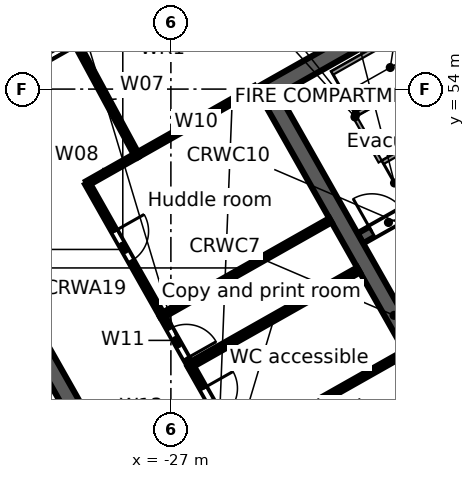
"""IFC4 building model, lengths in metres.
Left out: names, types, materials, properties, quantities, classifications, styles, units other than length and angle.
Written with IfcOpenShell. Run it as: python <this file> out.ifc"""

import sys

from ifc_helpers import new_model, si_unit, direction, frame, frame_2d, origin, place, context, subcontext, project, spatial, rectangle, extrude, element, fill, save


model = new_model("IFC4")
c1 = context("Model", 3, precision=1e-05, world=origin(), true_north=direction((0.0, 1.0)))
c2 = subcontext(c1, "Body", "Model", "MODEL_VIEW")
j1 = project(units=[si_unit("LENGTHUNIT", "METRE"), si_unit("PLANEANGLEUNIT", "RADIAN")], contexts=[c1])
p1 = place(None, origin())
s1 = spatial("IfcSite", under=j1, at=p1, CompositionType="ELEMENT")
p2 = place(p1, origin())
s2 = spatial("IfcBuilding", under=s1, at=p2, CompositionType="ELEMENT")
p3 = place(p2, frame((0.0, 0.0, 219.2)))
s3 = spatial("IfcBuildingStorey", under=s2, at=p3, CompositionType="ELEMENT", Elevation=219.2)
p4 = place(p3, frame((-0.046, 47.974, 0.0), z_axis=(0.0, 0.0, 1.0), x_axis=(-0.870356579543, -0.492421998337, 0.0)))
e1 = element("IfcWall", 1, at=p4, inside=s3, PredefinedType="STANDARD", context=c2, shape_type="SweptSolid", body=[
    extrude(rectangle(XDim=43.754, YDim=0.25, at=frame_2d((21.877, 0.0))), origin(), (0.0, 0.0, 1.0), 3.62),
])
p5 = place(p4, frame((41.061, 0.0, 0.8)))
e2 = element("IfcOpeningElement", 2, at=p5, cuts=e1, PredefinedType="OPENING", context=c2, shape_type="SweptSolid", body=[
    extrude(rectangle(XDim=2.4, YDim=2.2, at=frame_2d((1.2, 1.1))), frame((0.0, 0.135, 0.0), z_axis=(0.0, -1.0, 0.0), x_axis=(1.0, 0.0, 0.0)), (0.0, 0.0, 1.0), 0.27),
])
p6 = place(p4, frame((38.443, 0.0, 0.0)))
e3 = element("IfcOpeningElement", 3, at=p6, cuts=e1, PredefinedType="OPENING", context=c2, shape_type="SweptSolid", body=[
    extrude(rectangle(XDim=1.8, YDim=2.4, at=frame_2d((0.9, 1.2))), frame((0.0, 0.135, 0.0), z_axis=(0.0, -1.0, 0.0), x_axis=(1.0, 0.0, 0.0)), (0.0, 0.0, 1.0), 0.27),
])
p7 = place(p4, frame((35.225, 0.0, 0.8)))
e4 = element("IfcOpeningElement", 4, at=p7, cuts=e1, PredefinedType="OPENING", context=c2, shape_type="SweptSolid", body=[
    extrude(rectangle(XDim=2.4, YDim=2.2, at=frame_2d((1.2, 1.1))), frame((0.0, 0.135, 0.0), z_axis=(0.0, -1.0, 0.0), x_axis=(1.0, 0.0, 0.0)), (0.0, 0.0, 1.0), 0.27),
])
p8 = place(p4, frame((32.307, 0.0, 0.8)))
e5 = element("IfcOpeningElement", 5, at=p8, cuts=e1, PredefinedType="OPENING", context=c2, shape_type="SweptSolid", body=[
    extrude(rectangle(XDim=2.4, YDim=2.2, at=frame_2d((1.2, 1.1))), frame((0.0, 0.135, 0.0), z_axis=(0.0, -1.0, 0.0), x_axis=(1.0, 0.0, 0.0)), (0.0, 0.0, 1.0), 0.27),
])
p9 = place(p4, frame((29.688, 0.0, 0.0)))
e6 = element("IfcOpeningElement", 6, at=p9, cuts=e1, PredefinedType="OPENING", context=c2, shape_type="SweptSolid", body=[
    extrude(rectangle(XDim=1.8, YDim=2.4, at=frame_2d((0.9, 1.2))), frame((0.0, 0.135, 0.0), z_axis=(0.0, -1.0, 0.0), x_axis=(1.0, 0.0, 0.0)), (0.0, 0.0, 1.0), 0.27),
])
p10 = place(p4, frame((26.47, 0.0, 0.8)))
e7 = element("IfcOpeningElement", 7, at=p10, cuts=e1, PredefinedType="OPENING", context=c2, shape_type="SweptSolid", body=[
    extrude(rectangle(XDim=2.4, YDim=2.2, at=frame_2d((1.2, 1.1))), frame((0.0, 0.135, 0.0), z_axis=(0.0, -1.0, 0.0), x_axis=(1.0, 0.0, 0.0)), (0.0, 0.0, 1.0), 0.27),
])
p11 = place(p4, frame((23.552, 0.0, 0.8)))
e8 = element("IfcOpeningElement", 8, at=p11, cuts=e1, PredefinedType="OPENING", context=c2, shape_type="SweptSolid", body=[
    extrude(rectangle(XDim=2.4, YDim=2.2, at=frame_2d((1.2, 1.1))), frame((0.0, 0.135, 0.0), z_axis=(0.0, -1.0, 0.0), x_axis=(1.0, 0.0, 0.0)), (0.0, 0.0, 1.0), 0.27),
])
p12 = place(p4, frame((20.934, 0.0, 0.0)))
e9 = element("IfcOpeningElement", 9, at=p12, cuts=e1, PredefinedType="OPENING", context=c2, shape_type="SweptSolid", body=[
    extrude(rectangle(XDim=1.8, YDim=2.4, at=frame_2d((0.9, 1.2))), frame((0.0, 0.135, 0.0), z_axis=(0.0, -1.0, 0.0), x_axis=(1.0, 0.0, 0.0)), (0.0, 0.0, 1.0), 0.27),
])
p13 = place(p4, frame((17.716, 0.0, 0.8)))
e10 = element("IfcOpeningElement", 10, at=p13, cuts=e1, PredefinedType="OPENING", context=c2, shape_type="SweptSolid", body=[
    extrude(rectangle(XDim=2.4, YDim=2.2, at=frame_2d((1.2, 1.1))), frame((0.0, 0.135, 0.0), z_axis=(0.0, -1.0, 0.0), x_axis=(1.0, 0.0, 0.0)), (0.0, 0.0, 1.0), 0.27),
])
p14 = place(p4, frame((14.798, 0.0, 0.8)))
e11 = element("IfcOpeningElement", 11, at=p14, cuts=e1, PredefinedType="OPENING", context=c2, shape_type="SweptSolid", body=[
    extrude(rectangle(XDim=2.4, YDim=2.2, at=frame_2d((1.2, 1.1))), frame((0.0, 0.135, 0.0), z_axis=(0.0, -1.0, 0.0), x_axis=(1.0, 0.0, 0.0)), (0.0, 0.0, 1.0), 0.27),
])
p15 = place(p4, frame((12.179, 0.0, 0.0)))
e12 = element("IfcOpeningElement", 12, at=p15, cuts=e1, PredefinedType="OPENING", context=c2, shape_type="SweptSolid", body=[
    extrude(rectangle(XDim=1.8, YDim=2.4, at=frame_2d((0.9, 1.2))), frame((0.0, 0.135, 0.0), z_axis=(0.0, -1.0, 0.0), x_axis=(1.0, 0.0, 0.0)), (0.0, 0.0, 1.0), 0.27),
])
p16 = place(p4, frame((8.961, 0.0, 0.8)))
e13 = element("IfcOpeningElement", 13, at=p16, cuts=e1, PredefinedType="OPENING", context=c2, shape_type="SweptSolid", body=[
    extrude(rectangle(XDim=2.4, YDim=2.2, at=frame_2d((1.2, 1.1))), frame((0.0, 0.135, 0.0), z_axis=(0.0, -1.0, 0.0), x_axis=(1.0, 0.0, 0.0)), (0.0, 0.0, 1.0), 0.27),
])
p17 = place(p4, frame((6.043, 0.0, 0.8)))
e14 = element("IfcOpeningElement", 14, at=p17, cuts=e1, PredefinedType="OPENING", context=c2, shape_type="SweptSolid", body=[
    extrude(rectangle(XDim=2.4, YDim=2.2, at=frame_2d((1.2, 1.1))), frame((0.0, 0.135, 0.0), z_axis=(0.0, -1.0, 0.0), x_axis=(1.0, 0.0, 0.0)), (0.0, 0.0, 1.0), 0.27),
])
p18 = place(p4, frame((3.425, 0.0, 0.0)))
e15 = element("IfcOpeningElement", 15, at=p18, cuts=e1, PredefinedType="OPENING", context=c2, shape_type="SweptSolid", body=[
    extrude(rectangle(XDim=1.8, YDim=2.4, at=frame_2d((0.9, 1.2))), frame((0.0, 0.135, 0.0), z_axis=(0.0, -1.0, 0.0), x_axis=(1.0, 0.0, 0.0)), (0.0, 0.0, 1.0), 0.27),
])
p19 = place(p4, frame((0.207, 0.0, 0.8)))
e16 = element("IfcOpeningElement", 16, at=p19, cuts=e1, PredefinedType="OPENING", context=c2, shape_type="SweptSolid", body=[
    extrude(rectangle(XDim=2.4, YDim=2.2, at=frame_2d((1.2, 1.1))), frame((0.0, 0.135, 0.0), z_axis=(0.0, -1.0, 0.0), x_axis=(1.0, 0.0, 0.0)), (0.0, 0.0, 1.0), 0.27),
])
p20 = place(p3, frame((-58.732, 38.771, 0.0), z_axis=(0.0, 0.0, 1.0), x_axis=(0.870354824205, 0.492425100887, 0.0)))
e17 = element("IfcWall", 17, at=p20, inside=s3, PredefinedType="STANDARD", context=c2, shape_type="SweptSolid", body=[
    extrude(rectangle(XDim=64.006, YDim=0.25, at=frame_2d((32.003, 0.0))), origin(), (0.0, 0.0, 1.0), 3.62),
])
p21 = place(p20, frame((61.259, 0.0, 0.8)))
e18 = element("IfcOpeningElement", 18, at=p21, cuts=e17, PredefinedType="OPENING", context=c2, shape_type="SweptSolid", body=[
    extrude(rectangle(XDim=2.4, YDim=2.2, at=frame_2d((1.2, 1.1))), frame((0.0, 0.135, 0.0), z_axis=(0.0, -1.0, 0.0), x_axis=(1.0, 0.0, 0.0)), (0.0, 0.0, 1.0), 0.27),
])
p22 = place(p20, frame((58.216, 0.0, 0.8)))
e19 = element("IfcOpeningElement", 19, at=p22, cuts=e17, PredefinedType="OPENING", context=c2, shape_type="SweptSolid", body=[
    extrude(rectangle(XDim=2.4, YDim=2.2, at=frame_2d((1.2, 1.1))), frame((0.0, 0.135, 0.0), z_axis=(0.0, -1.0, 0.0), x_axis=(1.0, 0.0, 0.0)), (0.0, 0.0, 1.0), 0.27),
])
p23 = place(p20, frame((55.173, 0.0, 0.8)))
e20 = element("IfcOpeningElement", 20, at=p23, cuts=e17, PredefinedType="OPENING", context=c2, shape_type="SweptSolid", body=[
    extrude(rectangle(XDim=2.4, YDim=2.2, at=frame_2d((1.2, 1.1))), frame((0.0, 0.135, 0.0), z_axis=(0.0, -1.0, 0.0), x_axis=(1.0, 0.0, 0.0)), (0.0, 0.0, 1.0), 0.27),
])
p24 = place(p20, frame((52.129, 0.0, 0.8)))
e21 = element("IfcOpeningElement", 21, at=p24, cuts=e17, PredefinedType="OPENING", context=c2, shape_type="SweptSolid", body=[
    extrude(rectangle(XDim=2.4, YDim=2.2, at=frame_2d((1.2, 1.1))), frame((0.0, 0.135, 0.0), z_axis=(0.0, -1.0, 0.0), x_axis=(1.0, 0.0, 0.0)), (0.0, 0.0, 1.0), 0.27),
])
p25 = place(p20, frame((49.086, 0.0, 0.8)))
e22 = element("IfcOpeningElement", 22, at=p25, cuts=e17, PredefinedType="OPENING", context=c2, shape_type="SweptSolid", body=[
    extrude(rectangle(XDim=2.4, YDim=2.2, at=frame_2d((1.2, 1.1))), frame((0.0, 0.135, 0.0), z_axis=(0.0, -1.0, 0.0), x_axis=(1.0, 0.0, 0.0)), (0.0, 0.0, 1.0), 0.27),
])
p26 = place(p20, frame((46.043, 0.0, 0.8)))
e23 = element("IfcOpeningElement", 23, at=p26, cuts=e17, PredefinedType="OPENING", context=c2, shape_type="SweptSolid", body=[
    extrude(rectangle(XDim=2.4, YDim=2.2, at=frame_2d((1.2, 1.1))), frame((0.0, 0.135, 0.0), z_axis=(0.0, -1.0, 0.0), x_axis=(1.0, 0.0, 0.0)), (0.0, 0.0, 1.0), 0.27),
])
p27 = place(p20, frame((43.0, 0.0, 0.8)))
e24 = element("IfcOpeningElement", 24, at=p27, cuts=e17, PredefinedType="OPENING", context=c2, shape_type="SweptSolid", body=[
    extrude(rectangle(XDim=2.4, YDim=2.2, at=frame_2d((1.2, 1.1))), frame((0.0, 0.135, 0.0), z_axis=(0.0, -1.0, 0.0), x_axis=(1.0, 0.0, 0.0)), (0.0, 0.0, 1.0), 0.27),
])
p28 = place(p20, frame((39.956, 0.0, 0.8)))
e25 = element("IfcOpeningElement", 25, at=p28, cuts=e17, PredefinedType="OPENING", context=c2, shape_type="SweptSolid", body=[
    extrude(rectangle(XDim=2.4, YDim=2.2, at=frame_2d((1.2, 1.1))), frame((0.0, 0.135, 0.0), z_axis=(0.0, -1.0, 0.0), x_axis=(1.0, 0.0, 0.0)), (0.0, 0.0, 1.0), 0.27),
])
p29 = place(p20, frame((36.913, 0.0, 0.8)))
e26 = element("IfcOpeningElement", 26, at=p29, cuts=e17, PredefinedType="OPENING", context=c2, shape_type="SweptSolid", body=[
    extrude(rectangle(XDim=2.4, YDim=2.2, at=frame_2d((1.2, 1.1))), frame((0.0, 0.135, 0.0), z_axis=(0.0, -1.0, 0.0), x_axis=(1.0, 0.0, 0.0)), (0.0, 0.0, 1.0), 0.27),
])
p30 = place(p20, frame((33.87, 0.0, 0.8)))
e27 = element("IfcOpeningElement", 27, at=p30, cuts=e17, PredefinedType="OPENING", context=c2, shape_type="SweptSolid", body=[
    extrude(rectangle(XDim=2.4, YDim=2.2, at=frame_2d((1.2, 1.1))), frame((0.0, 0.135, 0.0), z_axis=(0.0, -1.0, 0.0), x_axis=(1.0, 0.0, 0.0)), (0.0, 0.0, 1.0), 0.27),
])
p31 = place(p20, frame((30.826, 0.0, 0.8)))
e28 = element("IfcOpeningElement", 28, at=p31, cuts=e17, PredefinedType="OPENING", context=c2, shape_type="SweptSolid", body=[
    extrude(rectangle(XDim=2.4, YDim=2.2, at=frame_2d((1.2, 1.1))), frame((0.0, 0.135, 0.0), z_axis=(0.0, -1.0, 0.0), x_axis=(1.0, 0.0, 0.0)), (0.0, 0.0, 1.0), 0.27),
])
p32 = place(p20, frame((27.783, 0.0, 0.8)))
e29 = element("IfcOpeningElement", 29, at=p32, cuts=e17, PredefinedType="OPENING", context=c2, shape_type="SweptSolid", body=[
    extrude(rectangle(XDim=2.4, YDim=2.2, at=frame_2d((1.2, 1.1))), frame((0.0, 0.135, 0.0), z_axis=(0.0, -1.0, 0.0), x_axis=(1.0, 0.0, 0.0)), (0.0, 0.0, 1.0), 0.27),
])
p33 = place(p20, frame((24.74, 0.0, 0.8)))
e30 = element("IfcOpeningElement", 30, at=p33, cuts=e17, PredefinedType="OPENING", context=c2, shape_type="SweptSolid", body=[
    extrude(rectangle(XDim=2.4, YDim=2.2, at=frame_2d((1.2, 1.1))), frame((0.0, 0.135, 0.0), z_axis=(0.0, -1.0, 0.0), x_axis=(1.0, 0.0, 0.0)), (0.0, 0.0, 1.0), 0.27),
])
p34 = place(p20, frame((21.696, 0.0, 0.8)))
e31 = element("IfcOpeningElement", 31, at=p34, cuts=e17, PredefinedType="OPENING", context=c2, shape_type="SweptSolid", body=[
    extrude(rectangle(XDim=2.4, YDim=2.2, at=frame_2d((1.2, 1.1))), frame((0.0, 0.135, 0.0), z_axis=(0.0, -1.0, 0.0), x_axis=(1.0, 0.0, 0.0)), (0.0, 0.0, 1.0), 0.27),
])
p35 = place(p20, frame((18.653, 0.0, 0.8)))
e32 = element("IfcOpeningElement", 32, at=p35, cuts=e17, PredefinedType="OPENING", context=c2, shape_type="SweptSolid", body=[
    extrude(rectangle(XDim=2.4, YDim=2.2, at=frame_2d((1.2, 1.1))), frame((0.0, 0.135, 0.0), z_axis=(0.0, -1.0, 0.0), x_axis=(1.0, 0.0, 0.0)), (0.0, 0.0, 1.0), 0.27),
])
p36 = place(p20, frame((15.61, 0.0, 0.8)))
e33 = element("IfcOpeningElement", 33, at=p36, cuts=e17, PredefinedType="OPENING", context=c2, shape_type="SweptSolid", body=[
    extrude(rectangle(XDim=2.4, YDim=2.2, at=frame_2d((1.2, 1.1))), frame((0.0, 0.135, 0.0), z_axis=(0.0, -1.0, 0.0), x_axis=(1.0, 0.0, 0.0)), (0.0, 0.0, 1.0), 0.27),
])
p37 = place(p20, frame((12.567, 0.0, 0.8)))
e34 = element("IfcOpeningElement", 34, at=p37, cuts=e17, PredefinedType="OPENING", context=c2, shape_type="SweptSolid", body=[
    extrude(rectangle(XDim=2.4, YDim=2.2, at=frame_2d((1.2, 1.1))), frame((0.0, 0.135, 0.0), z_axis=(0.0, -1.0, 0.0), x_axis=(1.0, 0.0, 0.0)), (0.0, 0.0, 1.0), 0.27),
])
p38 = place(p20, frame((9.523, 0.0, 0.8)))
e35 = element("IfcOpeningElement", 35, at=p38, cuts=e17, PredefinedType="OPENING", context=c2, shape_type="SweptSolid", body=[
    extrude(rectangle(XDim=2.4, YDim=2.2, at=frame_2d((1.2, 1.1))), frame((0.0, 0.135, 0.0), z_axis=(0.0, -1.0, 0.0), x_axis=(1.0, 0.0, 0.0)), (0.0, 0.0, 1.0), 0.27),
])
p39 = place(p20, frame((6.48, 0.0, 0.8)))
e36 = element("IfcOpeningElement", 36, at=p39, cuts=e17, PredefinedType="OPENING", context=c2, shape_type="SweptSolid", body=[
    extrude(rectangle(XDim=2.4, YDim=2.2, at=frame_2d((1.2, 1.1))), frame((0.0, 0.135, 0.0), z_axis=(0.0, -1.0, 0.0), x_axis=(1.0, 0.0, 0.0)), (0.0, 0.0, 1.0), 0.27),
])
p40 = place(p20, frame((3.437, 0.0, 0.8)))
e37 = element("IfcOpeningElement", 37, at=p40, cuts=e17, PredefinedType="OPENING", context=c2, shape_type="SweptSolid", body=[
    extrude(rectangle(XDim=2.4, YDim=2.2, at=frame_2d((1.2, 1.1))), frame((0.0, 0.135, 0.0), z_axis=(0.0, -1.0, 0.0), x_axis=(1.0, 0.0, 0.0)), (0.0, 0.0, 1.0), 0.27),
])
p41 = place(p20, frame((0.393, 0.0, 0.8)))
e38 = element("IfcOpeningElement", 38, at=p41, cuts=e17, PredefinedType="OPENING", context=c2, shape_type="SweptSolid", body=[
    extrude(rectangle(XDim=2.4, YDim=2.2, at=frame_2d((1.2, 1.1))), frame((0.0, 0.135, 0.0), z_axis=(0.0, -1.0, 0.0), x_axis=(1.0, 0.0, 0.0)), (0.0, 0.0, 1.0), 0.27),
])
p42 = place(p3, frame((-31.787, 49.542, 0.0), z_axis=(0.0, 0.0, 1.0), x_axis=(0.492421378713, -0.870356930107, 0.0)))
e39 = element("IfcWall", 39, at=p42, inside=s3, PredefinedType="SOLIDWALL", context=c2, shape_type="SweptSolid", body=[
    extrude(rectangle(XDim=13.1, YDim=0.45, at=frame_2d((6.55, 0.0))), origin(), (0.0, 0.0, 1.0), 3.62),
])
p43 = place(p3, frame((-22.015, 50.072, 0.0), z_axis=(0.0, 0.0, 1.0), x_axis=(0.870354900257, 0.492424966466, 0.0)))
e40 = element("IfcWall", 40, at=p43, inside=s3, PredefinedType="SOLIDWALL", context=c2, shape_type="SweptSolid", body=[
    extrude(rectangle(XDim=7.35, YDim=0.3, at=frame_2d((3.675, 0.0))), origin(), (0.0, 0.0, 1.0), 3.62),
])
p44 = place(p43, frame((0.35, 0.0, 0.0)))
e41 = element("IfcOpeningElement", 41, at=p44, cuts=e40, PredefinedType="OPENING", context=c2, shape_type="SweptSolid", body=[
    extrude(rectangle(XDim=1.0, YDim=2.1, at=frame_2d((0.5, 1.05))), frame((0.0, 0.16, 0.0), z_axis=(0.0, -1.0, 0.0), x_axis=(1.0, 0.0, 0.0)), (0.0, 0.0, 1.0), 0.32),
])
p45 = place(p3, frame((-24.66, 53.832, 0.0), z_axis=(0.0, 0.0, 1.0), x_axis=(0.870353598469, 0.492427267353, 0.0)))
e42 = element("IfcWall", 42, at=p45, inside=s3, PredefinedType="SOLIDWALL", context=c2, shape_type="SweptSolid", body=[
    extrude(rectangle(XDim=15.0, YDim=0.45, at=frame_2d((7.5, 0.0))), origin(), (0.0, 0.0, 1.0), 3.62),
])
p46 = place(p3, frame((-24.353, 53.747, 0.0), z_axis=(0.0, 0.0, 1.0), x_axis=(0.492435496286, -0.870348942665, 0.0)))
e43 = element("IfcWall", 43, at=p46, inside=s3, PredefinedType="SOLIDWALL", context=c2, shape_type="SweptSolid", body=[
    extrude(rectangle(XDim=13.1, YDim=0.45, at=frame_2d((6.55, 0.0))), origin(), (0.0, 0.0, 1.0), 3.62),
])
p47 = place(p3, frame((-29.474, 55.181, 0.0), z_axis=(0.0, 0.0, 1.0), x_axis=(0.475344759365, -0.879799613403, 0.0)))
e44 = element("IfcWall", 44, at=p47, inside=s3, PredefinedType="PARTITIONING", context=c2, shape_type="SweptSolid", body=[
    extrude(rectangle(XDim=3.32, YDim=0.125, at=frame_2d((1.66, 0.0))), origin(), (0.0, 0.0, 1.0), 2.988),
])
p48 = place(p3, frame((-29.201, 51.521, 0.0), z_axis=(0.0, 0.0, 1.0), x_axis=(0.870150176056, 0.492786638526, 0.0)))
e45 = element("IfcWall", 45, at=p48, inside=s3, PredefinedType="PARTITIONING", context=c2, shape_type="SweptSolid", body=[
    extrude(rectangle(XDim=1.5, YDim=0.125, at=frame_2d((0.75, 0.0))), origin(), (0.0, 0.0, 1.0), 3.62),
])
p49 = place(p3, frame((-29.201, 51.521, 0.0), z_axis=(0.0, 0.0, 1.0), x_axis=(0.492340861121, -0.870402479587, 0.0)))
e46 = element("IfcWall", 46, at=p49, inside=s3, PredefinedType="PARTITIONING", context=c2, shape_type="SweptSolid", body=[
    extrude(rectangle(XDim=3.999, YDim=0.125, at=frame_2d((2.0, 0.0))), origin(), (0.0, 0.0, 1.0), 3.62),
])
p50 = place(p49, frame((1.45, 0.0, 0.0)))
e47 = element("IfcOpeningElement", 47, at=p50, cuts=e46, PredefinedType="OPENING", context=c2, shape_type="SweptSolid", body=[
    extrude(rectangle(XDim=0.9, YDim=2.1, at=frame_2d((0.45, 1.05))), frame((0.0, 0.073, 0.0), z_axis=(0.0, -1.0, 0.0), x_axis=(1.0, 0.0, 0.0)), (0.0, 0.0, 1.0), 0.145),
])
p51 = place(p3, frame((-27.896, 52.26, 0.0), z_axis=(0.0, 0.0, 1.0), x_axis=(0.870352535776, 0.492429145632, 0.0)))
e48 = element("IfcWall", 48, at=p51, inside=s3, PredefinedType="PARTITIONING", context=c2, shape_type="SweptSolid", body=[
    extrude(rectangle(XDim=3.591, YDim=0.125, at=frame_2d((1.795, 0.0))), origin(), (0.0, 0.0, 1.0), 2.892),
])
p52 = place(p3, frame((-27.232, 48.04, 0.0), z_axis=(0.0, 0.0, 1.0), x_axis=(0.492437810475, -0.870347633314, 0.0)))
e49 = element("IfcWall", 49, at=p52, inside=s3, PredefinedType="PARTITIONING", context=c2, shape_type="SweptSolid", body=[
    extrude(rectangle(XDim=1.501, YDim=0.125, at=frame_2d((0.75, 0.0))), origin(), (0.0, 0.0, 1.0), 3.62),
])
p53 = place(p52, frame((0.4, 0.0, 0.0)))
e50 = element("IfcOpeningElement", 50, at=p53, cuts=e49, PredefinedType="OPENING", context=c2, shape_type="SweptSolid", body=[
    extrude(rectangle(XDim=0.9, YDim=2.1, at=frame_2d((0.45, 1.05))), frame((0.0, 0.073, 0.0), z_axis=(0.0, -1.0, 0.0), x_axis=(1.0, 0.0, 0.0)), (0.0, 0.0, 1.0), 0.145),
])
p54 = place(p3, frame((-27.232, 48.04, 0.0), z_axis=(0.0, 0.0, 1.0), x_axis=(0.870339461844, 0.492452252668, 0.0)))
e51 = element("IfcWall", 51, at=p54, inside=s3, PredefinedType="PARTITIONING", context=c2, shape_type="SweptSolid", body=[
    extrude(rectangle(XDim=5.091, YDim=0.125, at=frame_2d((2.545, 0.0))), origin(), (0.0, 0.0, 1.0), 2.892),
])
p55 = place(p3, frame((-26.493, 46.734, 0.0), z_axis=(0.0, 0.0, 1.0), x_axis=(0.49257867544, -0.870267917656, 0.0)))
e52 = element("IfcWall", 52, at=p55, inside=s3, PredefinedType="PARTITIONING", context=c2, shape_type="SweptSolid", body=[
    extrude(rectangle(XDim=2.499, YDim=0.15, at=frame_2d((1.25, 0.0))), origin(), (0.0, 0.0, 1.0), 2.892),
])
p56 = place(p55, frame((0.7, 0.0, 0.0)))
e53 = element("IfcOpeningElement", 53, at=p56, cuts=e52, PredefinedType="OPENING", context=c2, shape_type="SweptSolid", body=[
    extrude(rectangle(XDim=0.9, YDim=2.1, at=frame_2d((0.45, 1.05))), frame((0.0, 0.085, 0.0), z_axis=(0.0, -1.0, 0.0), x_axis=(1.0, 0.0, 0.0)), (0.0, 0.0, 1.0), 0.17),
])
p57 = place(p3, frame((-26.493, 46.734, 0.0), z_axis=(0.0, 0.0, 1.0), x_axis=(0.870339461844, 0.492452252668, 0.0)))
e54 = element("IfcWall", 54, at=p57, inside=s3, PredefinedType="PARTITIONING", context=c2, shape_type="SweptSolid", body=[
    extrude(rectangle(XDim=5.091, YDim=0.15, at=frame_2d((2.545, 0.0))), origin(), (0.0, 0.0, 1.0), 2.892),
])
p58 = place(p3, frame((-25.262, 44.559, 0.0), z_axis=(0.0, 0.0, 1.0), x_axis=(0.870442223229, 0.492270592276, 0.0)))
e55 = element("IfcWall", 55, at=p58, inside=s3, PredefinedType="PARTITIONING", context=c2, shape_type="SweptSolid", body=[
    extrude(rectangle(XDim=5.09, YDim=0.125, at=frame_2d((2.545, 0.0))), origin(), (0.0, 0.0, 1.0), 3.62),
])
p59 = place(p31, origin())
e56 = element("IfcWindow", 56, at=p59, inside=s3, PartitioningType="SINGLE_PANEL", PredefinedType="WINDOW", context=c2, shape_type="SweptSolid", body=[
    extrude(rectangle(XDim=2.4, YDim=2.2, at=frame_2d((1.2, 1.1))), frame((0.0, 0.03, 0.0), z_axis=(0.0, -1.0, 0.0), x_axis=(1.0, 0.0, 0.0)), (0.0, 0.0, 1.0), 0.06),
])
fill(e28, e56)
p60 = place(p44, origin())
e57 = element("IfcDoor", 57, at=p60, inside=s3, OperationType="SINGLE_SWING_LEFT", PredefinedType="DOOR", context=c2, shape_type="SweptSolid", body=[
    extrude(rectangle(XDim=1.0, YDim=2.1, at=frame_2d((0.5, 1.05))), frame((0.0, 0.025, 0.0), z_axis=(0.0, -1.0, 0.0), x_axis=(1.0, 0.0, 0.0)), (0.0, 0.0, 1.0), 0.05),
])
fill(e41, e57)
p61 = place(p50, origin())
e58 = element("IfcDoor", 58, at=p61, inside=s3, OperationType="SINGLE_SWING_LEFT", PredefinedType="DOOR", context=c2, shape_type="SweptSolid", body=[
    extrude(rectangle(XDim=0.9, YDim=2.1, at=frame_2d((0.45, 1.05))), frame((0.0, 0.025, 0.0), z_axis=(0.0, -1.0, 0.0), x_axis=(1.0, 0.0, 0.0)), (0.0, 0.0, 1.0), 0.05),
])
fill(e47, e58)
p62 = place(p56, origin())
e59 = element("IfcDoor", 59, at=p62, inside=s3, OperationType="SINGLE_SWING_LEFT", PredefinedType="DOOR", context=c2, shape_type="SweptSolid", body=[
    extrude(rectangle(XDim=0.9, YDim=2.1, at=frame_2d((0.45, 1.05))), frame((0.0, 0.025, 0.0), z_axis=(0.0, -1.0, 0.0), x_axis=(1.0, 0.0, 0.0)), (0.0, 0.0, 1.0), 0.05),
])
fill(e53, e59)
p63 = place(p53, origin())
e60 = element("IfcDoor", 60, at=p63, inside=s3, OperationType="SINGLE_SWING_RIGHT", PredefinedType="DOOR", context=c2, shape_type="SweptSolid", body=[
    extrude(rectangle(XDim=0.9, YDim=2.1, at=frame_2d((0.45, 1.05))), frame((0.0, 0.025, 0.0), z_axis=(0.0, -1.0, 0.0), x_axis=(1.0, 0.0, 0.0)), (0.0, 0.0, 1.0), 0.05),
])
fill(e50, e60)
save(model, sys.argv[1])
